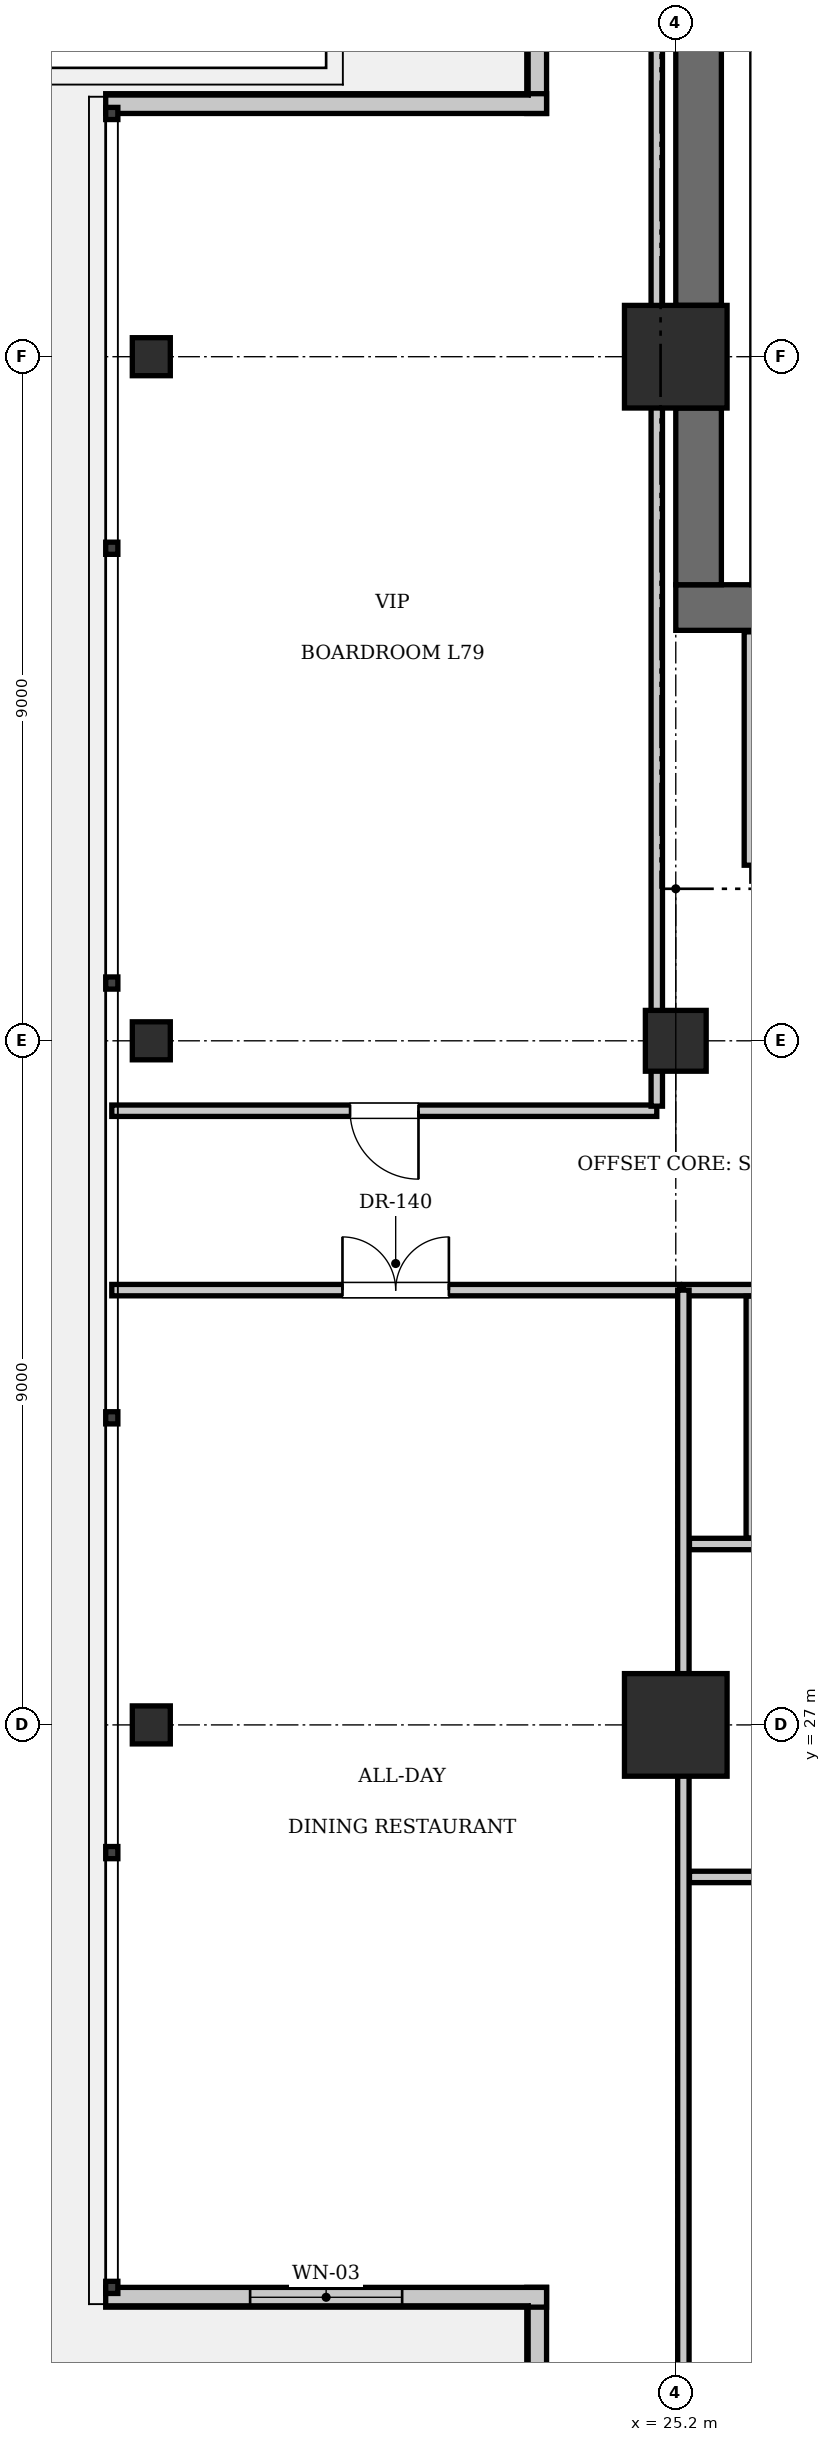
"""IFC4 building model, lengths in metres.
Left out: names, types, materials, properties, quantities, classifications, styles, units other than length and angle.
Written with IfcOpenShell. Run it as: python <this file> out.ifc"""

import sys

from ifc_helpers import new_model, si_unit, direction, frame, frame_2d, origin, origin_2d, place, context, subcontext, project, spatial, rectangle, i_section, extrude, element, fill, save


model = new_model("IFC4")
c1 = context("Model", 3, precision=1e-05, world=origin(), true_north=direction((0.0, 1.0)))
c2 = subcontext(c1, "Body", "Model", "MODEL_VIEW")
j1 = project(units=[si_unit("LENGTHUNIT", "METRE"), si_unit("PLANEANGLEUNIT", "RADIAN")], contexts=[c1])
p1 = place(None, origin())
s1 = spatial("IfcSite", under=j1, at=p1, CompositionType="ELEMENT")
p2 = place(p1, origin())
s2 = spatial("IfcBuilding", under=s1, at=p2, CompositionType="ELEMENT")
p3 = place(p2, frame((0.0, 0.0, 322.0)))
s3 = spatial("IfcBuildingStorey", under=s2, at=p3, CompositionType="ELEMENT", Elevation=322.0)
for number, where, z_axis, x_axis in (
    (1, (25.2, 27.0, 0.0), (0.0, 0.0, 1.0), (1.0, 0.0, 0.0)),
    (2, (25.2, 45.0, 0.0), (0.0, 0.0, 1.0), (1.0, 0.0, 0.0)),
):
    element("IfcColumn", number, at=place(p3, frame(where, z_axis=z_axis, x_axis=x_axis)), inside=s3, PredefinedType="COLUMN", context=c2, shape_type="SweptSolid", body=[
        extrude(rectangle(XDim=1.35, YDim=1.35, at=origin_2d()), origin(), (0.0, 0.0, 1.0), 3.85),
    ])
p4 = place(p3, frame((25.2, 41.7, 0.0), z_axis=(0.0, 0.0, 1.0), x_axis=(1.0, 0.0, 0.0)))
e3 = element("IfcWall", 3, at=p4, inside=s3, PredefinedType="SHEAR", context=c2, shape_type="SweptSolid", body=[
    extrude(rectangle(XDim=6.8, YDim=0.6, at=frame_2d((3.4, 0.0))), origin(), (0.0, 0.0, 1.0), 3.85),
])
p5 = place(p4, frame((1.65, 0.0, 0.0)))
e4 = element("IfcOpeningElement", 4, at=p5, cuts=e3, PredefinedType="OPENING", context=c2, shape_type="SweptSolid", body=[
    extrude(rectangle(XDim=1.15, YDim=2.15, at=frame_2d((0.575, 1.075))), frame((0.0, 0.31, 0.0), z_axis=(0.0, -1.0, 0.0), x_axis=(1.0, 0.0, 0.0)), (0.0, 0.0, 1.0), 0.62),
])
p6 = place(p4, frame((5.15, 0.0, 0.0)))
e5 = element("IfcOpeningElement", 5, at=p6, cuts=e3, PredefinedType="OPENING", context=c2, shape_type="SweptSolid", body=[
    extrude(rectangle(XDim=1.1, YDim=2.2, at=frame_2d((0.55, 1.1))), frame((0.0, 0.31, 0.0), z_axis=(0.0, -1.0, 0.0), x_axis=(1.0, 0.0, 0.0)), (0.0, 0.0, 1.0), 0.62),
])
p7 = place(p3, frame((25.5, 42.0, 0.0), z_axis=(0.0, 0.0, 1.0), x_axis=(0.0, 1.0, 0.0)))
e6 = element("IfcWall", 6, at=p7, inside=s3, PredefinedType="SHEAR", context=c2, shape_type="SweptSolid", body=[
    extrude(rectangle(XDim=2.325, YDim=0.6, at=frame_2d((1.163, 0.0))), origin(), (0.0, 0.0, 1.0), 3.85),
])
p8 = place(p3, frame((25.5, 45.675, 0.0), z_axis=(0.0, 0.0, 1.0), x_axis=(0.0, 1.0, 0.0)))
e7 = element("IfcWall", 7, at=p8, inside=s3, PredefinedType="SHEAR", context=c2, shape_type="SweptSolid", body=[
    extrude(rectangle(XDim=7.725, YDim=0.6, at=frame_2d((3.862, 0.0))), origin(), (0.0, 0.0, 1.0), 3.85),
])
p9 = place(p3, frame((25.2, 36.0, 0.0), z_axis=(0.0, 0.0, 1.0), x_axis=(1.0, 0.0, 0.0)))
e8 = element("IfcColumn", 8, at=p9, inside=s3, PredefinedType="COLUMN", context=c2, shape_type="SweptSolid", body=[
    extrude(rectangle(XDim=0.8, YDim=0.8, at=origin_2d()), origin(), (0.0, 0.0, 1.0), 3.85),
])
for number, where, z_axis, x_axis in (
    (9, (18.3, 27.0, -0.24), (0.0, 0.0, 1.0), (1.0, 0.0, 0.0)),
    (10, (18.3, 36.0, -0.24), (0.0, 0.0, 1.0), (1.0, 0.0, 0.0)),
    (11, (18.3, 45.0, -0.24), (0.0, 0.0, 1.0), (1.0, 0.0, 0.0)),
):
    element("IfcColumn", number, at=place(p3, frame(where, z_axis=z_axis, x_axis=x_axis)), inside=s3, PredefinedType="COLUMN", context=c2, shape_type="SweptSolid", body=[
        extrude(i_section(OverallWidth=0.5, OverallDepth=0.5, WebThickness=0.022, FlangeThickness=0.032, at=origin_2d()), origin(), (0.0, 0.0, 1.0), 4.09),
    ])
p10 = place(p3, frame((23.37, 13.8, 0.0), z_axis=(0.0, 0.0, 1.0), x_axis=(0.0, 1.0, 0.0)))
e12 = element("IfcWall", 12, at=p10, inside=s3, PredefinedType="SOLIDWALL", context=c2, shape_type="SweptSolid", body=[
    extrude(rectangle(XDim=5.8, YDim=0.26, at=frame_2d((2.9, 0.0))), origin(), (0.0, 0.0, 1.0), 3.61),
])
p11 = place(p3, frame((23.5, 19.47, 0.0), z_axis=(0.0, 0.0, 1.0), x_axis=(-1.0, 0.0, 0.0)))
e13 = element("IfcWall", 13, at=p11, inside=s3, PredefinedType="SOLIDWALL", context=c2, shape_type="SweptSolid", body=[
    extrude(rectangle(XDim=5.8, YDim=0.26, at=frame_2d((2.9, 0.0))), origin(), (0.0, 0.0, 1.0), 3.61),
])
p12 = place(p11, frame((1.9, 0.0, 0.9)))
e14 = element("IfcOpeningElement", 14, at=p12, cuts=e13, PredefinedType="OPENING", context=c2, shape_type="SweptSolid", body=[
    extrude(rectangle(XDim=2.0, YDim=2.2, at=frame_2d((1.0, 1.1))), frame((0.0, 0.14, 0.0), z_axis=(0.0, -1.0, 0.0), x_axis=(1.0, 0.0, 0.0)), (0.0, 0.0, 1.0), 0.28),
])
for number, where, z_axis, x_axis in (
    (15, (23.37, 48.2, 0.0), (0.0, 0.0, 1.0), (0.0, 1.0, 0.0)),
    (16, (17.7, 48.33, 0.0), (0.0, 0.0, 1.0), (1.0, 0.0, 0.0)),
):
    element("IfcWall", number, at=place(p3, frame(where, z_axis=z_axis, x_axis=x_axis)), inside=s3, PredefinedType="SOLIDWALL", context=c2, shape_type="SweptSolid", body=[
        extrude(rectangle(XDim=5.8, YDim=0.26, at=frame_2d((2.9, 0.0))), origin(), (0.0, 0.0, 1.0), 3.61),
    ])
p13 = place(p3, frame((26.2, 38.2, 0.0), z_axis=(0.0, 0.0, 1.0), x_axis=(1.0, 0.0, 0.0)))
e17 = element("IfcWall", 17, at=p13, inside=s3, PredefinedType="PARTITIONING", context=c2, shape_type="SweptSolid", body=[
    extrude(rectangle(XDim=5.8, YDim=0.2, at=frame_2d((2.9, 0.0))), origin(), (0.0, 0.0, 1.0), 3.61),
])
p14 = place(p13, frame((2.3, 0.0, 0.0)))
e18 = element("IfcOpeningElement", 18, at=p14, cuts=e17, PredefinedType="OPENING", context=c2, shape_type="SweptSolid", body=[
    extrude(rectangle(XDim=1.15, YDim=2.15, at=frame_2d((0.575, 1.075))), frame((0.0, 0.11, 0.0), z_axis=(0.0, -1.0, 0.0), x_axis=(1.0, 0.0, 0.0)), (0.0, 0.0, 1.0), 0.22),
])
p15 = place(p3, frame((26.2, 38.31, 0.0), z_axis=(0.0, 0.0, 1.0), x_axis=(0.0, 1.0, 0.0)))
e19 = element("IfcWall", 19, at=p15, inside=s3, PredefinedType="PARTITIONING", context=c2, shape_type="SweptSolid", body=[
    extrude(rectangle(XDim=3.07, YDim=0.2, at=frame_2d((1.535, 0.0))), origin(), (0.0, 0.0, 1.0), 3.61),
])
p16 = place(p3, frame((25.3, 32.72, 0.0), z_axis=(0.0, 0.0, 1.0), x_axis=(1.0, 0.0, 0.0)))
e20 = element("IfcWall", 20, at=p16, inside=s3, PredefinedType="PARTITIONING", context=c2, shape_type="SweptSolid", body=[
    extrude(rectangle(XDim=3.88, YDim=0.15, at=frame_2d((1.94, 0.0))), origin(), (0.0, 0.0, 1.0), 3.61),
])
p17 = place(p16, frame((1.2, 0.0, 0.0)))
e21 = element("IfcOpeningElement", 21, at=p17, cuts=e20, PredefinedType="OPENING", context=c2, shape_type="SweptSolid", body=[
    extrude(rectangle(XDim=0.9, YDim=2.1, at=frame_2d((0.45, 1.05))), frame((0.0, 0.085, 0.0), z_axis=(0.0, -1.0, 0.0), x_axis=(1.0, 0.0, 0.0)), (0.0, 0.0, 1.0), 0.17),
])
p18 = place(p3, frame((25.38, 29.38, 0.0), z_axis=(0.0, 0.0, 1.0), x_axis=(1.0, 0.0, 0.0)))
e22 = element("IfcWall", 22, at=p18, inside=s3, PredefinedType="PARTITIONING", context=c2, shape_type="SweptSolid", body=[
    extrude(rectangle(XDim=6.54, YDim=0.15, at=frame_2d((3.27, 0.0))), origin(), (0.0, 0.0, 1.0), 3.61),
])
p19 = place(p3, frame((26.2, 29.46, 0.0), z_axis=(0.0, 0.0, 1.0), x_axis=(0.0, 1.0, 0.0)))
e23 = element("IfcWall", 23, at=p19, inside=s3, PredefinedType="PARTITIONING", context=c2, shape_type="SweptSolid", body=[
    extrude(rectangle(XDim=3.18, YDim=0.15, at=frame_2d((1.59, 0.0))), origin(), (0.0, 0.0, 1.0), 3.61),
])
p20 = place(p3, frame((25.38, 25.0, 0.0), z_axis=(0.0, 0.0, 1.0), x_axis=(1.0, 0.0, 0.0)))
e24 = element("IfcWall", 24, at=p20, inside=s3, PredefinedType="PARTITIONING", context=c2, shape_type="SweptSolid", body=[
    extrude(rectangle(XDim=10.06, YDim=0.15, at=frame_2d((5.03, 0.0))), origin(), (0.0, 0.0, 1.0), 3.61),
])
p21 = place(p20, frame((7.2, 0.0, 0.0)))
e25 = element("IfcOpeningElement", 25, at=p21, cuts=e24, PredefinedType="OPENING", context=c2, shape_type="SweptSolid", body=[
    extrude(rectangle(XDim=1.6, YDim=2.3, at=frame_2d((0.8, 1.15))), frame((0.0, 0.085, 0.0), z_axis=(0.0, -1.0, 0.0), x_axis=(1.0, 0.0, 0.0)), (0.0, 0.0, 1.0), 0.17),
])
p22 = place(p3, frame((17.78, 32.72, 0.0), z_axis=(0.0, 0.0, 1.0), x_axis=(1.0, 0.0, 0.0)))
e26 = element("IfcWall", 26, at=p22, inside=s3, PredefinedType="PARTITIONING", context=c2, shape_type="SweptSolid", body=[
    extrude(rectangle(XDim=7.47, YDim=0.15, at=frame_2d((3.735, 0.0))), origin(), (0.0, 0.0, 1.0), 3.61),
])
p23 = place(p22, frame((3.035, 0.0, 0.0)))
e27 = element("IfcOpeningElement", 27, at=p23, cuts=e26, PredefinedType="OPENING", context=c2, shape_type="SweptSolid", body=[
    extrude(rectangle(XDim=1.4, YDim=2.2, at=frame_2d((0.7, 1.1))), frame((0.0, 0.085, 0.0), z_axis=(0.0, -1.0, 0.0), x_axis=(1.0, 0.0, 0.0)), (0.0, 0.0, 1.0), 0.17),
])
p24 = place(p3, frame((25.3, 13.88, 0.0), z_axis=(0.0, 0.0, 1.0), x_axis=(0.0, 1.0, 0.0)))
e28 = element("IfcWall", 28, at=p24, inside=s3, PredefinedType="PARTITIONING", context=c2, shape_type="SweptSolid", body=[
    extrude(rectangle(XDim=18.84, YDim=0.15, at=frame_2d((9.42, 0.0))), origin(), (0.0, 0.0, 1.0), 3.141),
])
p25 = place(p3, frame((17.78, 35.08, 0.0), z_axis=(0.0, 0.0, 1.0), x_axis=(1.0, 0.0, 0.0)))
e29 = element("IfcWall", 29, at=p25, inside=s3, PredefinedType="PARTITIONING", context=c2, shape_type="SweptSolid", body=[
    extrude(rectangle(XDim=7.17, YDim=0.15, at=frame_2d((3.585, 0.0))), origin(), (0.0, 0.0, 1.0), 3.61),
])
p26 = place(p25, frame((3.135, 0.0, 0.0)))
e30 = element("IfcOpeningElement", 30, at=p26, cuts=e29, PredefinedType="OPENING", context=c2, shape_type="SweptSolid", body=[
    extrude(rectangle(XDim=0.9, YDim=2.1, at=frame_2d((0.45, 1.05))), frame((0.0, 0.085, 0.0), z_axis=(0.0, -1.0, 0.0), x_axis=(1.0, 0.0, 0.0)), (0.0, 0.0, 1.0), 0.17),
])
p27 = place(p3, frame((24.95, 35.14, 0.0), z_axis=(0.0, 0.0, 1.0), x_axis=(0.0, 1.0, 0.0)))
e31 = element("IfcWall", 31, at=p27, inside=s3, PredefinedType="PARTITIONING", context=c2, shape_type="SweptSolid", body=[
    extrude(rectangle(XDim=18.78, YDim=0.15, at=frame_2d((9.39, 0.0))), origin(), (0.0, 0.0, 1.0), 3.61),
])
p28 = place(p12, origin())
e32 = element("IfcWindow", 32, at=p28, inside=s3, PartitioningType="SINGLE_PANEL", PredefinedType="WINDOW", context=c2, shape_type="SweptSolid", body=[
    extrude(rectangle(XDim=2.0, YDim=2.2, at=frame_2d((1.0, 1.1))), frame((0.0, 0.03, 0.0), z_axis=(0.0, -1.0, 0.0), x_axis=(1.0, 0.0, 0.0)), (0.0, 0.0, 1.0), 0.06),
])
fill(e14, e32)
p29 = place(p23, origin())
e33 = element("IfcDoor", 33, at=p29, inside=s3, OperationType="DOUBLE_DOOR_SINGLE_SWING", PredefinedType="DOOR", context=c2, shape_type="SweptSolid", body=[
    extrude(rectangle(XDim=1.4, YDim=2.2, at=frame_2d((0.7, 1.1))), frame((0.0, 0.025, 0.0), z_axis=(0.0, -1.0, 0.0), x_axis=(1.0, 0.0, 0.0)), (0.0, 0.0, 1.0), 0.05),
])
fill(e27, e33)
p30 = place(p26, frame((0.9, 0.0, 0.0), z_axis=(0.0, 0.0, 1.0), x_axis=(-1.0, 0.0, 0.0)))
e34 = element("IfcDoor", 34, at=p30, inside=s3, OperationType="SINGLE_SWING_LEFT", PredefinedType="DOOR", context=c2, shape_type="SweptSolid", body=[
    extrude(rectangle(XDim=0.9, YDim=2.1, at=frame_2d((0.45, 1.05))), frame((0.0, 0.025, 0.0), z_axis=(0.0, -1.0, 0.0), x_axis=(1.0, 0.0, 0.0)), (0.0, 0.0, 1.0), 0.05),
])
fill(e30, e34)
save(model, sys.argv[1])
